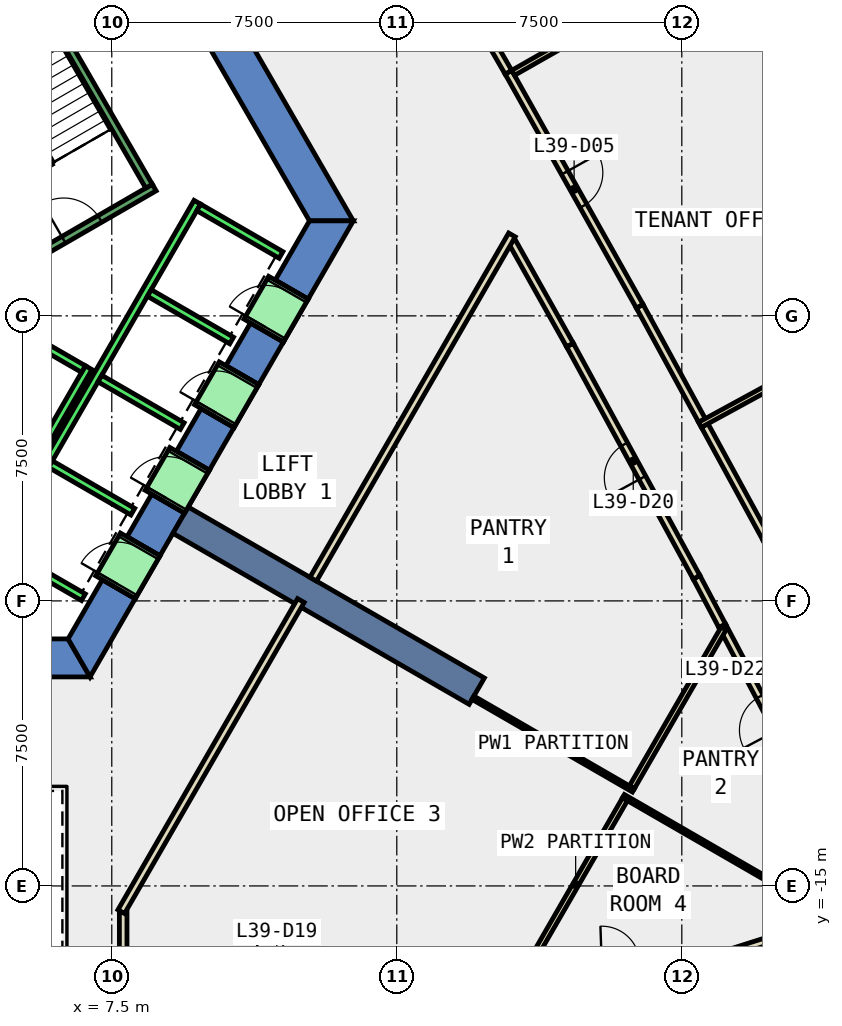
"""IFC4 building model, lengths in metres.
Left out: names, types, materials, properties, quantities, classifications, styles, units other than length and angle.
Written with IfcOpenShell. Run it as: python <this file> out.ifc"""

import sys

from ifc_helpers import new_model, si_unit, direction, frame, frame_2d, origin, place, context, subcontext, project, spatial, polyline, rectangle, outline, extrude, element, fill, save


model = new_model("IFC4")
c1 = context("Model", 3, precision=1e-05, world=origin(), true_north=direction((0.0, 1.0)))
c2 = subcontext(c1, "Body", "Model", "MODEL_VIEW")
j1 = project(units=[si_unit("LENGTHUNIT", "METRE"), si_unit("PLANEANGLEUNIT", "RADIAN")], contexts=[c1])
p1 = place(None, origin())
s1 = spatial("IfcSite", under=j1, at=p1, CompositionType="ELEMENT")
p2 = place(p1, origin())
s2 = spatial("IfcBuilding", under=s1, at=p2, CompositionType="ELEMENT")
p3 = place(p2, frame((0.0, 0.0, 176.0)))
s3 = spatial("IfcBuildingStorey", under=s2, at=p3, CompositionType="ELEMENT", Elevation=176.0)
p4 = place(p3, frame((0.0, 0.0, -0.4)))
e1 = element("IfcWall", 1, at=p4, inside=s3, PredefinedType="SHEAR", context=c2, shape_type="SweptSolid", body=[
    extrude(outline(polyline([(8.517, 11.748), (7.651, 11.248), (12.702, 2.5), (13.856, 2.5), (8.517, 11.748)])), origin(), (0.0, 0.0, 1.0), 4.2),
])
p5 = place(p3, frame((0.0, 0.0, -0.4)))
e2 = element("IfcWall", 2, at=p5, inside=s3, PredefinedType="SHEAR", context=c2, shape_type="SweptSolid", body=[
    extrude(outline(polyline([(5.75, -8.5), (5.75, -9.5), (6.928, -9.5), (6.351, -8.5), (5.75, -8.5)])), origin(), (0.0, 0.0, 1.0), 4.2),
])
p6 = place(p3, frame((0.0, 0.0, -0.4)))
e3 = element("IfcWall", 3, at=p6, inside=s3, PredefinedType="SHEAR", context=c2, shape_type="SweptSolid", body=[
    extrude(outline(polyline([(8.117, -7.44), (7.252, -6.94), (6.351, -8.5), (6.928, -9.5), (8.117, -7.44)])), origin(), (0.0, 0.0, 1.0), 4.2),
])
p7 = place(p3, frame((0.0, 0.0, -0.4)))
e4 = element("IfcWall", 4, at=p7, inside=s3, PredefinedType="SHEAR", context=c2, shape_type="SweptSolid", body=[
    extrude(outline(polyline([(9.417, -5.189), (8.551, -4.689), (7.902, -5.814), (8.767, -6.314), (9.417, -5.189)])), origin(), (0.0, 0.0, 1.0), 4.2),
])
p8 = place(p3, frame((0.0, 0.0, -0.4)))
e5 = element("IfcWall", 5, at=p8, inside=s3, PredefinedType="SHEAR", context=c2, shape_type="SweptSolid", body=[
    extrude(outline(polyline([(10.717, -2.937), (9.851, -2.437), (9.201, -3.563), (10.067, -4.063), (10.717, -2.937)])), origin(), (0.0, 0.0, 1.0), 4.2),
])
p9 = place(p3, frame((0.0, 0.0, -0.4)))
e6 = element("IfcWall", 6, at=p9, inside=s3, PredefinedType="SHEAR", context=c2, shape_type="SweptSolid", body=[
    extrude(outline(polyline([(12.017, -0.686), (11.151, -0.186), (10.501, -1.311), (11.367, -1.811), (12.017, -0.686)])), origin(), (0.0, 0.0, 1.0), 4.2),
])
p10 = place(p3, frame((0.0, 0.0, -0.4)))
e7 = element("IfcWall", 7, at=p10, inside=s3, PredefinedType="SHEAR", context=c2, shape_type="SweptSolid", body=[
    extrude(outline(polyline([(11.801, 0.94), (12.667, 0.44), (13.856, 2.5), (12.702, 2.5), (11.801, 0.94)])), origin(), (0.0, 0.0, 1.0), 4.2),
])
p11 = place(p3, frame((0.0, 0.0, 3.6)))
e8 = element("IfcWall", 8, at=p11, inside=s3, PredefinedType="SHEAR", context=c2, shape_type="SweptSolid", body=[
    extrude(outline(polyline([(8.767, -6.314), (7.902, -5.814), (7.252, -6.94), (8.117, -7.44), (8.767, -6.314)])), origin(), (0.0, 0.0, 1.0), 0.2),
])
p12 = place(p3, frame((0.0, 0.0, 3.6)))
e9 = element("IfcWall", 9, at=p12, inside=s3, PredefinedType="SHEAR", context=c2, shape_type="SweptSolid", body=[
    extrude(outline(polyline([(10.067, -4.063), (9.201, -3.563), (8.551, -4.689), (9.417, -5.189), (10.067, -4.063)])), origin(), (0.0, 0.0, 1.0), 0.2),
])
p13 = place(p3, frame((0.0, 0.0, 3.6)))
e10 = element("IfcWall", 10, at=p13, inside=s3, PredefinedType="SHEAR", context=c2, shape_type="SweptSolid", body=[
    extrude(outline(polyline([(11.367, -1.811), (10.501, -1.311), (9.851, -2.437), (10.717, -2.937), (11.367, -1.811)])), origin(), (0.0, 0.0, 1.0), 0.2),
])
p14 = place(p3, frame((0.0, 0.0, 3.6)))
e11 = element("IfcWall", 11, at=p14, inside=s3, PredefinedType="SHEAR", context=c2, shape_type="SweptSolid", body=[
    extrude(outline(polyline([(12.667, 0.44), (11.801, 0.94), (11.151, -0.186), (12.017, -0.686), (12.667, 0.44)])), origin(), (0.0, 0.0, 1.0), 0.2),
])
p15 = place(p3, frame((9.31, -5.375, -0.4), z_axis=(0.0, 0.0, 1.0), x_axis=(0.866017533419, -0.500013631625, 0.0)))
e12 = element("IfcWall", 12, at=p15, inside=s3, PredefinedType="SHEAR", context=c2, shape_type="SweptSolid", body=[
    extrude(rectangle(XDim=9.0, YDim=0.8, at=frame_2d((4.5, 0.0))), origin(), (0.0, 0.0, 1.0), 4.2),
])
p16 = place(p3, frame((26.857, 3.9, 0.0), z_axis=(0.0, 0.0, 1.0), x_axis=(-0.489305602904, 0.872112393541, 0.0)))
e13 = element("IfcWall", 13, at=p16, inside=s3, PredefinedType="STANDARD", context=c2, shape_type="SweptSolid", body=[
    extrude(rectangle(XDim=5.969, YDim=0.3, at=frame_2d((2.985, 0.0))), origin(), (0.0, 0.0, 1.0), 3.8),
])
p17 = place(p16, frame((0.492, 0.0, 0.9)))
e14 = element("IfcOpeningElement", 14, at=p17, cuts=e13, PredefinedType="OPENING", context=c2, shape_type="SweptSolid", body=[
    extrude(rectangle(XDim=2.0, YDim=2.6, at=frame_2d((1.0, 1.3))), frame((0.0, 0.16, 0.0), z_axis=(0.0, -1.0, 0.0), x_axis=(1.0, 0.0, 0.0)), (0.0, 0.0, 1.0), 0.32),
])
p18 = place(p16, frame((3.477, 0.0, 0.9)))
e15 = element("IfcOpeningElement", 15, at=p18, cuts=e13, PredefinedType="OPENING", context=c2, shape_type="SweptSolid", body=[
    extrude(rectangle(XDim=2.0, YDim=2.6, at=frame_2d((1.0, 1.3))), frame((0.0, 0.16, 0.0), z_axis=(0.0, -1.0, 0.0), x_axis=(1.0, 0.0, 0.0)), (0.0, 0.0, 1.0), 0.32),
])
p19 = place(p3, frame((23.565, -8.158, 0.0), z_axis=(0.0, 0.0, 1.0), x_axis=(-0.46753134131, 0.883976495668, 0.0)))
e16 = element("IfcWall", 16, at=p19, inside=s3, PredefinedType="PARTITIONING", context=c2, shape_type="SweptSolid", body=[
    extrude(rectangle(XDim=1.448, YDim=0.2, at=frame_2d((0.724, 0.0))), origin(), (0.0, 0.0, 1.0), 3.75),
])
p20 = place(p3, frame((22.888, -6.878, 0.0), z_axis=(0.0, 0.0, 1.0), x_axis=(-0.478665365973, 0.877997418799, 0.0)))
e17 = element("IfcWall", 17, at=p20, inside=s3, PredefinedType="PARTITIONING", context=c2, shape_type="SweptSolid", body=[
    extrude(rectangle(XDim=6.961, YDim=0.2, at=frame_2d((3.48, 0.0))), origin(), (0.0, 0.0, 1.0), 3.75),
])
p21 = place(p20, frame((2.981, 0.0, 0.0)))
e18 = element("IfcOpeningElement", 18, at=p21, cuts=e17, PredefinedType="OPENING", context=c2, shape_type="SweptSolid", body=[
    extrude(rectangle(XDim=1.0, YDim=2.1, at=frame_2d((0.5, 1.05))), frame((0.0, 0.11, 0.0), z_axis=(0.0, -1.0, 0.0), x_axis=(1.0, 0.0, 0.0)), (0.0, 0.0, 1.0), 0.22),
])
p22 = place(p3, frame((19.556, -0.766, 0.0), z_axis=(0.0, 0.0, 1.0), x_axis=(-0.489198731197, 0.872172346154, 0.0)))
e19 = element("IfcWall", 19, at=p22, inside=s3, PredefinedType="PARTITIONING", context=c2, shape_type="SweptSolid", body=[
    extrude(rectangle(XDim=3.121, YDim=0.2, at=frame_2d((1.561, 0.0))), origin(), (0.0, 0.0, 1.0), 3.75),
])
p23 = place(p3, frame((23.249, -16.93, 0.0), z_axis=(0.0, 0.0, 1.0), x_axis=(0.953158072423, 0.302472625167, 0.0)))
e20 = element("IfcWall", 20, at=p23, inside=s3, PredefinedType="PARTITIONING", context=c2, shape_type="SweptSolid", body=[
    extrude(rectangle(XDim=2.743, YDim=0.2, at=frame_2d((1.372, 0.0))), origin(), (0.0, 0.0, 1.0), 3.75),
])
p24 = place(p3, frame((26.0, -12.762, 0.0), z_axis=(0.0, 0.0, 1.0), x_axis=(-0.467534471159, 0.883974840297, 0.0)))
e21 = element("IfcWall", 21, at=p24, inside=s3, PredefinedType="PARTITIONING", context=c2, shape_type="SweptSolid", body=[
    extrude(rectangle(XDim=5.208, YDim=0.2, at=frame_2d((2.604, 0.0))), origin(), (0.0, 0.0, 1.0), 3.75),
])
p25 = place(p24, frame((2.104, 0.0, 0.0)))
e22 = element("IfcOpeningElement", 22, at=p25, cuts=e21, PredefinedType="OPENING", context=c2, shape_type="SweptSolid", body=[
    extrude(rectangle(XDim=1.0, YDim=2.1, at=frame_2d((0.5, 1.05))), frame((0.0, 0.11, 0.0), z_axis=(0.0, -1.0, 0.0), x_axis=(1.0, 0.0, 0.0)), (0.0, 0.0, 1.0), 0.22),
])
p26 = place(p3, frame((23.102, -2.884, 0.0), z_axis=(0.0, 0.0, 1.0), x_axis=(0.478646929322, -0.878007469815, 0.0)))
e23 = element("IfcWall", 23, at=p26, inside=s3, PredefinedType="PARTITIONING", context=c2, shape_type="SweptSolid", body=[
    extrude(rectangle(XDim=3.418, YDim=0.2, at=frame_2d((1.709, 0.0))), origin(), (0.0, 0.0, 1.0), 3.75),
])
p27 = place(p3, frame((17.938, 6.411, 0.0), z_axis=(0.0, 0.0, 1.0), x_axis=(0.48930419744, -0.872113182086, 0.0)))
e24 = element("IfcWall", 24, at=p27, inside=s3, PredefinedType="PARTITIONING", context=c2, shape_type="SweptSolid", body=[
    extrude(rectangle(XDim=7.063, YDim=0.2, at=frame_2d((3.532, 0.0))), origin(), (0.0, 0.0, 1.0), 3.75),
])
p28 = place(p27, frame((3.032, 0.0, 0.0)))
e25 = element("IfcOpeningElement", 25, at=p28, cuts=e24, PredefinedType="OPENING", context=c2, shape_type="SweptSolid", body=[
    extrude(rectangle(XDim=1.0, YDim=2.1, at=frame_2d((0.5, 1.05))), frame((0.0, 0.11, 0.0), z_axis=(0.0, -1.0, 0.0), x_axis=(1.0, 0.0, 0.0)), (0.0, 0.0, 1.0), 0.22),
])
p29 = place(p3, frame((21.394, 0.251, 0.0), z_axis=(0.0, 0.0, 1.0), x_axis=(0.478406883784, -0.878138288397, 0.0)))
e26 = element("IfcWall", 26, at=p29, inside=s3, PredefinedType="PARTITIONING", context=c2, shape_type="SweptSolid", body=[
    extrude(rectangle(XDim=3.42, YDim=0.2, at=frame_2d((1.71, 0.0))), origin(), (0.0, 0.0, 1.0), 3.75),
])
p30 = place(p3, frame((14.482, 12.395, 0.0), z_axis=(0.0, 0.0, 1.0), x_axis=(0.499953847993, -0.866052048018, 0.0)))
e27 = element("IfcWall", 27, at=p30, inside=s3, PredefinedType="PARTITIONING", context=c2, shape_type="SweptSolid", body=[
    extrude(rectangle(XDim=6.911, YDim=0.2, at=frame_2d((3.456, 0.0))), origin(), (0.0, 0.0, 1.0), 3.75),
])
p31 = place(p30, frame((3.03, 0.0, 0.0)))
e28 = element("IfcOpeningElement", 28, at=p31, cuts=e27, PredefinedType="OPENING", context=c2, shape_type="SweptSolid", body=[
    extrude(rectangle(XDim=1.0, YDim=2.1, at=frame_2d((0.5, 1.05))), frame((0.0, 0.11, 0.0), z_axis=(0.0, -1.0, 0.0), x_axis=(1.0, 0.0, 0.0)), (0.0, 0.0, 1.0), 0.22),
])
p32 = place(p3, frame((7.8, -15.69, 0.0), z_axis=(0.0, 0.0, 1.0), x_axis=(0.0, -1.0, 0.0)))
e29 = element("IfcWall", 29, at=p32, inside=s3, PredefinedType="PARTITIONING", context=c2, shape_type="SweptSolid", body=[
    extrude(rectangle(XDim=1.597, YDim=0.2, at=frame_2d((0.799, 0.0))), origin(), (0.0, 0.0, 1.0), 3.75),
])
p33 = place(p3, frame((12.476, -7.491, 0.0), z_axis=(0.0, 0.0, 1.0), x_axis=(-0.499989258007, -0.866031605588, 0.0)))
e30 = element("IfcWall", 30, at=p33, inside=s3, PredefinedType="PARTITIONING", context=c2, shape_type="SweptSolid", body=[
    extrude(rectangle(XDim=9.452, YDim=0.2, at=frame_2d((4.726, 0.0))), origin(), (0.0, 0.0, 1.0), 3.75),
])
p34 = place(p3, frame((18.03, 2.13, 0.0), z_axis=(0.0, 0.0, 1.0), x_axis=(-0.499919790729, -0.866071707676, 0.0)))
e31 = element("IfcWall", 31, at=p34, inside=s3, PredefinedType="PARTITIONING", context=c2, shape_type="SweptSolid", body=[
    extrude(rectangle(XDim=10.46, YDim=0.2, at=frame_2d((5.23, 0.0))), origin(), (0.0, 0.0, 1.0), 3.75),
])
p35 = place(p3, frame((17.004, -10.047, 0.0), z_axis=(0.0, 0.0, 1.0), x_axis=(0.865997117979, -0.500048989253, 0.0)))
e32 = element("IfcWall", 32, at=p35, inside=s3, PredefinedType="PARTITIONING", context=c2, shape_type="SweptSolid", body=[
    extrude(rectangle(XDim=4.875, YDim=0.1, at=frame_2d((2.438, 0.0))), origin(), (0.0, 0.0, 1.0), 3.75),
])
p36 = place(p3, frame((21.004, -12.719, 0.0), z_axis=(0.0, 0.0, 1.0), x_axis=(-0.499877157623, -0.866096315249, 0.0)))
e33 = element("IfcWall", 33, at=p36, inside=s3, PredefinedType="PARTITIONING", context=c2, shape_type="SweptSolid", body=[
    extrude(rectangle(XDim=5.191, YDim=0.15, at=frame_2d((2.596, 0.0))), origin(), (0.0, 0.0, 1.0), 3.75),
])
p37 = place(p3, frame((23.6, -8.224, 0.0), z_axis=(0.0, 0.0, 1.0), x_axis=(-0.500120854176, -0.865955617349, 0.0)))
e34 = element("IfcWall", 34, at=p37, inside=s3, PredefinedType="PARTITIONING", context=c2, shape_type="SweptSolid", body=[
    extrude(rectangle(XDim=4.827, YDim=0.15, at=frame_2d((2.414, 0.0))), origin(), (0.0, 0.0, 1.0), 3.75),
])
p38 = place(p3, frame((20.964, -12.638, 0.0), z_axis=(0.0, 0.0, 1.0), x_axis=(0.865981737723, -0.500075624211, 0.0)))
e35 = element("IfcWall", 35, at=p38, inside=s3, PredefinedType="PARTITIONING", context=c2, shape_type="SweptSolid", body=[
    extrude(rectangle(XDim=6.203, YDim=0.1, at=frame_2d((3.102, 0.0))), origin(), (0.0, 0.0, 1.0), 3.75),
])
p39 = place(p3, frame((22.978, -2.866, 0.0), z_axis=(0.0, 0.0, 1.0), x_axis=(0.878049098929, 0.478570558925, 0.0)))
e36 = element("IfcWall", 36, at=p39, inside=s3, PredefinedType="PARTITIONING", context=c2, shape_type="SweptSolid", body=[
    extrude(rectangle(XDim=6.501, YDim=0.15, at=frame_2d((3.25, 0.0))), origin(), (0.0, 0.0, 1.0), 3.75),
])
p40 = place(p3, frame((18.062, 6.395, 0.0), z_axis=(0.0, 0.0, 1.0), x_axis=(0.869113540562, 0.494612629854, 0.0)))
e37 = element("IfcWall", 37, at=p40, inside=s3, PredefinedType="PARTITIONING", context=c2, shape_type="SweptSolid", body=[
    extrude(rectangle(XDim=4.929, YDim=0.15, at=frame_2d((2.465, 0.0))), origin(), (0.0, 0.0, 1.0), 3.75),
])
p41 = place(p3, frame((5.492, -3.788, 0.0), z_axis=(0.0, 0.0, 1.0), x_axis=(0.500011755427, 0.866018616679, 0.0)))
e38 = element("IfcWall", 38, at=p41, inside=s3, PredefinedType="STANDARD", context=c2, shape_type="SweptSolid", body=[
    extrude(rectangle(XDim=2.8, YDim=0.2, at=frame_2d((1.4, 0.0))), origin(), (0.0, 0.0, 1.0), 3.75),
])
p42 = place(p3, frame((4.677, -0.2, 0.0), z_axis=(0.0, 0.0, 1.0), x_axis=(0.865973769406, -0.500089422704, 0.0)))
e39 = element("IfcWall", 39, at=p42, inside=s3, PredefinedType="STANDARD", context=c2, shape_type="SweptSolid", body=[
    extrude(rectangle(XDim=2.399, YDim=0.2, at=frame_2d((1.2, 0.0))), origin(), (0.0, 0.0, 1.0), 3.75),
])
p43 = place(p3, frame((4.451, -6.19, 0.0), z_axis=(0.0, 0.0, 1.0), x_axis=(0.50000090737, 0.866024879913, 0.0)))
e40 = element("IfcWall", 40, at=p43, inside=s3, PredefinedType="STANDARD", context=c2, shape_type="SweptSolid", body=[
    extrude(rectangle(XDim=10.6, YDim=0.2, at=frame_2d((5.3, 0.0))), origin(), (0.0, 0.0, 1.0), 3.75),
])
for number, where, z_axis, x_axis in (
    (41, (4.588, -6.153, 0.0), (0.0, 0.0, 1.0), (0.866, -0.5, 0.0)),
    (42, (5.888, -3.902, 0.0), (0.0, 0.0, 1.0), (0.866, -0.5, 0.0)),
    (43, (7.188, -1.65, 0.0), (0.0, 0.0, 1.0), (0.866, -0.5, 0.0)),
    (44, (8.488, 0.602, 0.0), (0.0, 0.0, 1.0), (0.866, -0.5, 0.0)),
):
    element("IfcWall", number, at=place(p3, frame(where, z_axis=z_axis, x_axis=x_axis)), inside=s3, PredefinedType="STANDARD", context=c2, shape_type="SweptSolid", body=[
        extrude(rectangle(XDim=2.5, YDim=0.2, at=frame_2d((1.25, 0.0))), origin(), (0.0, 0.0, 1.0), 3.75),
    ])
p44 = place(p3, frame((9.788, 2.853, 0.0), z_axis=(0.0, 0.0, 1.0), x_axis=(0.865998541277, -0.500046524342, 0.0)))
e45 = element("IfcWall", 45, at=p44, inside=s3, PredefinedType="STANDARD", context=c2, shape_type="SweptSolid", body=[
    extrude(rectangle(XDim=2.5, YDim=0.2, at=frame_2d((1.25, 0.0))), origin(), (0.0, 0.0, 1.0), 3.75),
])
p45 = place(p3, frame((7.598, -7.14, 0.0), z_axis=(0.0, 0.0, 1.0), x_axis=(0.500362116554, 0.865816234728, 0.0)))
e46 = element("IfcWall", 46, at=p45, inside=s3, PredefinedType="STANDARD", context=c2, shape_type="SweptSolid", body=[
    extrude(rectangle(XDim=1.299, YDim=1.2, at=frame_2d((0.65, 0.0))), origin(), (0.0, 0.0, 1.0), 2.4),
])
p46 = place(p45, frame((0.1, 0.0, 0.0)))
e47 = element("IfcOpeningElement", 47, at=p46, cuts=e46, PredefinedType="OPENING", context=c2, shape_type="SweptSolid", body=[
    extrude(rectangle(XDim=1.1, YDim=2.3, at=frame_2d((0.55, 1.15))), frame((0.0, 0.61, 0.0), z_axis=(0.0, -1.0, 0.0), x_axis=(1.0, 0.0, 0.0)), (0.0, 0.0, 1.0), 1.22),
])
p47 = place(p3, frame((8.898, -4.889, 0.0), z_axis=(0.0, 0.0, 1.0), x_axis=(0.500036693733, 0.866004217611, 0.0)))
e48 = element("IfcWall", 48, at=p47, inside=s3, PredefinedType="STANDARD", context=c2, shape_type="SweptSolid", body=[
    extrude(rectangle(XDim=1.3, YDim=1.2, at=frame_2d((0.65, 0.0))), origin(), (0.0, 0.0, 1.0), 2.4),
])
p48 = place(p47, frame((0.1, 0.0, 0.0)))
e49 = element("IfcOpeningElement", 49, at=p48, cuts=e48, PredefinedType="OPENING", context=c2, shape_type="SweptSolid", body=[
    extrude(rectangle(XDim=1.1, YDim=2.3, at=frame_2d((0.55, 1.15))), frame((0.0, 0.61, 0.0), z_axis=(0.0, -1.0, 0.0), x_axis=(1.0, 0.0, 0.0)), (0.0, 0.0, 1.0), 1.22),
])
p49 = place(p3, frame((10.198, -2.637, 0.0), z_axis=(0.0, 0.0, 1.0), x_axis=(0.49989585183, 0.866085525409, 0.0)))
e50 = element("IfcWall", 50, at=p49, inside=s3, PredefinedType="STANDARD", context=c2, shape_type="SweptSolid", body=[
    extrude(rectangle(XDim=1.3, YDim=1.2, at=frame_2d((0.65, 0.0))), origin(), (0.0, 0.0, 1.0), 2.4),
])
p50 = place(p49, frame((0.1, 0.0, 0.0)))
e51 = element("IfcOpeningElement", 51, at=p50, cuts=e50, PredefinedType="OPENING", context=c2, shape_type="SweptSolid", body=[
    extrude(rectangle(XDim=1.1, YDim=2.3, at=frame_2d((0.55, 1.15))), frame((0.0, 0.61, 0.0), z_axis=(0.0, -1.0, 0.0), x_axis=(1.0, 0.0, 0.0)), (0.0, 0.0, 1.0), 1.22),
])
p51 = place(p3, frame((11.498, -0.385, 0.0), z_axis=(0.0, 0.0, 1.0), x_axis=(0.500221244143, 0.865897630733, 0.0)))
e52 = element("IfcWall", 52, at=p51, inside=s3, PredefinedType="STANDARD", context=c2, shape_type="SweptSolid", body=[
    extrude(rectangle(XDim=1.299, YDim=1.2, at=frame_2d((0.65, 0.0))), origin(), (0.0, 0.0, 1.0), 2.4),
])
p52 = place(p51, frame((0.1, 0.0, 0.0)))
e53 = element("IfcOpeningElement", 53, at=p52, cuts=e52, PredefinedType="OPENING", context=c2, shape_type="SweptSolid", body=[
    extrude(rectangle(XDim=1.1, YDim=2.3, at=frame_2d((0.55, 1.15))), frame((0.0, 0.61, 0.0), z_axis=(0.0, -1.0, 0.0), x_axis=(1.0, 0.0, 0.0)), (0.0, 0.0, 1.0), 1.22),
])
p53 = place(p3, frame((4.806, 1.176, 0.0), z_axis=(0.0, 0.0, 1.0), x_axis=(0.866059941101, 0.499940174841, 0.0)))
e54 = element("IfcWall", 54, at=p53, inside=s3, PredefinedType="STANDARD", context=c2, shape_type="SweptSolid", body=[
    extrude(rectangle(XDim=4.4, YDim=0.2, at=frame_2d((2.2, 0.0))), origin(), (0.0, 0.0, 1.0), 3.75),
])
p54 = place(p53, frame((1.65, 0.0, 0.0)))
e55 = element("IfcOpeningElement", 55, at=p54, cuts=e54, PredefinedType="OPENING", context=c2, shape_type="SweptSolid", body=[
    extrude(rectangle(XDim=1.1, YDim=2.2, at=frame_2d((0.55, 1.1))), frame((0.0, 0.11, 0.0), z_axis=(0.0, -1.0, 0.0), x_axis=(1.0, 0.0, 0.0)), (0.0, 0.0, 1.0), 0.22),
])
p55 = place(p3, frame((8.48, 3.412, 0.0), z_axis=(0.0, 0.0, 1.0), x_axis=(-0.499978703459, 0.866037698999, 0.0)))
e56 = element("IfcWall", 56, at=p55, inside=s3, PredefinedType="STANDARD", context=c2, shape_type="SweptSolid", body=[
    extrude(rectangle(XDim=6.9, YDim=0.2, at=frame_2d((3.45, 0.0))), origin(), (0.0, 0.0, 1.0), 3.75),
])
p56 = place(p18, origin())
e57 = element("IfcWindow", 57, at=p56, inside=s3, PartitioningType="SINGLE_PANEL", PredefinedType="WINDOW", context=c2, shape_type="SweptSolid", body=[
    extrude(rectangle(XDim=2.0, YDim=2.6, at=frame_2d((1.0, 1.3))), frame((0.0, 0.03, 0.0), z_axis=(0.0, -1.0, 0.0), x_axis=(1.0, 0.0, 0.0)), (0.0, 0.0, 1.0), 0.06),
])
fill(e15, e57)
p57 = place(p28, origin())
e58 = element("IfcDoor", 58, at=p57, inside=s3, OperationType="SINGLE_SWING_LEFT", PredefinedType="DOOR", context=c2, shape_type="SweptSolid", body=[
    extrude(rectangle(XDim=1.0, YDim=2.1, at=frame_2d((0.5, 1.05))), frame((0.0, 0.025, 0.0), z_axis=(0.0, -1.0, 0.0), x_axis=(1.0, 0.0, 0.0)), (0.0, 0.0, 1.0), 0.05),
])
fill(e25, e58)
p58 = place(p21, origin())
e59 = element("IfcDoor", 59, at=p58, inside=s3, OperationType="SINGLE_SWING_LEFT", PredefinedType="DOOR", context=c2, shape_type="SweptSolid", body=[
    extrude(rectangle(XDim=1.0, YDim=2.1, at=frame_2d((0.5, 1.05))), frame((0.0, 0.025, 0.0), z_axis=(0.0, -1.0, 0.0), x_axis=(1.0, 0.0, 0.0)), (0.0, 0.0, 1.0), 0.05),
])
fill(e18, e59)
p59 = place(p25, origin())
e60 = element("IfcDoor", 60, at=p59, inside=s3, OperationType="SINGLE_SWING_LEFT", PredefinedType="DOOR", context=c2, shape_type="SweptSolid", body=[
    extrude(rectangle(XDim=1.0, YDim=2.1, at=frame_2d((0.5, 1.05))), frame((0.0, 0.025, 0.0), z_axis=(0.0, -1.0, 0.0), x_axis=(1.0, 0.0, 0.0)), (0.0, 0.0, 1.0), 0.05),
])
fill(e22, e60)
p60 = place(p46, origin())
e61 = element("IfcDoor", 61, at=p60, inside=s3, OperationType="SLIDING_TO_LEFT", PredefinedType="DOOR", context=c2, shape_type="SweptSolid", body=[
    extrude(rectangle(XDim=1.1, YDim=2.3, at=frame_2d((0.55, 1.15))), frame((0.0, 0.025, 0.0), z_axis=(0.0, -1.0, 0.0), x_axis=(1.0, 0.0, 0.0)), (0.0, 0.0, 1.0), 0.05),
])
fill(e47, e61)
p61 = place(p48, origin())
e62 = element("IfcDoor", 62, at=p61, inside=s3, OperationType="SLIDING_TO_LEFT", PredefinedType="DOOR", context=c2, shape_type="SweptSolid", body=[
    extrude(rectangle(XDim=1.1, YDim=2.3, at=frame_2d((0.55, 1.15))), frame((0.0, 0.025, 0.0), z_axis=(0.0, -1.0, 0.0), x_axis=(1.0, 0.0, 0.0)), (0.0, 0.0, 1.0), 0.05),
])
fill(e49, e62)
p62 = place(p50, origin())
e63 = element("IfcDoor", 63, at=p62, inside=s3, OperationType="SLIDING_TO_LEFT", PredefinedType="DOOR", context=c2, shape_type="SweptSolid", body=[
    extrude(rectangle(XDim=1.1, YDim=2.3, at=frame_2d((0.55, 1.15))), frame((0.0, 0.025, 0.0), z_axis=(0.0, -1.0, 0.0), x_axis=(1.0, 0.0, 0.0)), (0.0, 0.0, 1.0), 0.05),
])
fill(e51, e63)
p63 = place(p52, origin())
e64 = element("IfcDoor", 64, at=p63, inside=s3, OperationType="SLIDING_TO_LEFT", PredefinedType="DOOR", context=c2, shape_type="SweptSolid", body=[
    extrude(rectangle(XDim=1.1, YDim=2.3, at=frame_2d((0.55, 1.15))), frame((0.0, 0.025, 0.0), z_axis=(0.0, -1.0, 0.0), x_axis=(1.0, 0.0, 0.0)), (0.0, 0.0, 1.0), 0.05),
])
fill(e53, e64)
p64 = place(p54, origin())
e65 = element("IfcDoor", 65, at=p64, inside=s3, OperationType="SINGLE_SWING_LEFT", PredefinedType="DOOR", context=c2, shape_type="SweptSolid", body=[
    extrude(rectangle(XDim=1.1, YDim=2.2, at=frame_2d((0.55, 1.1))), frame((0.0, 0.025, 0.0), z_axis=(0.0, -1.0, 0.0), x_axis=(1.0, 0.0, 0.0)), (0.0, 0.0, 1.0), 0.05),
])
fill(e55, e65)
save(model, sys.argv[1])
